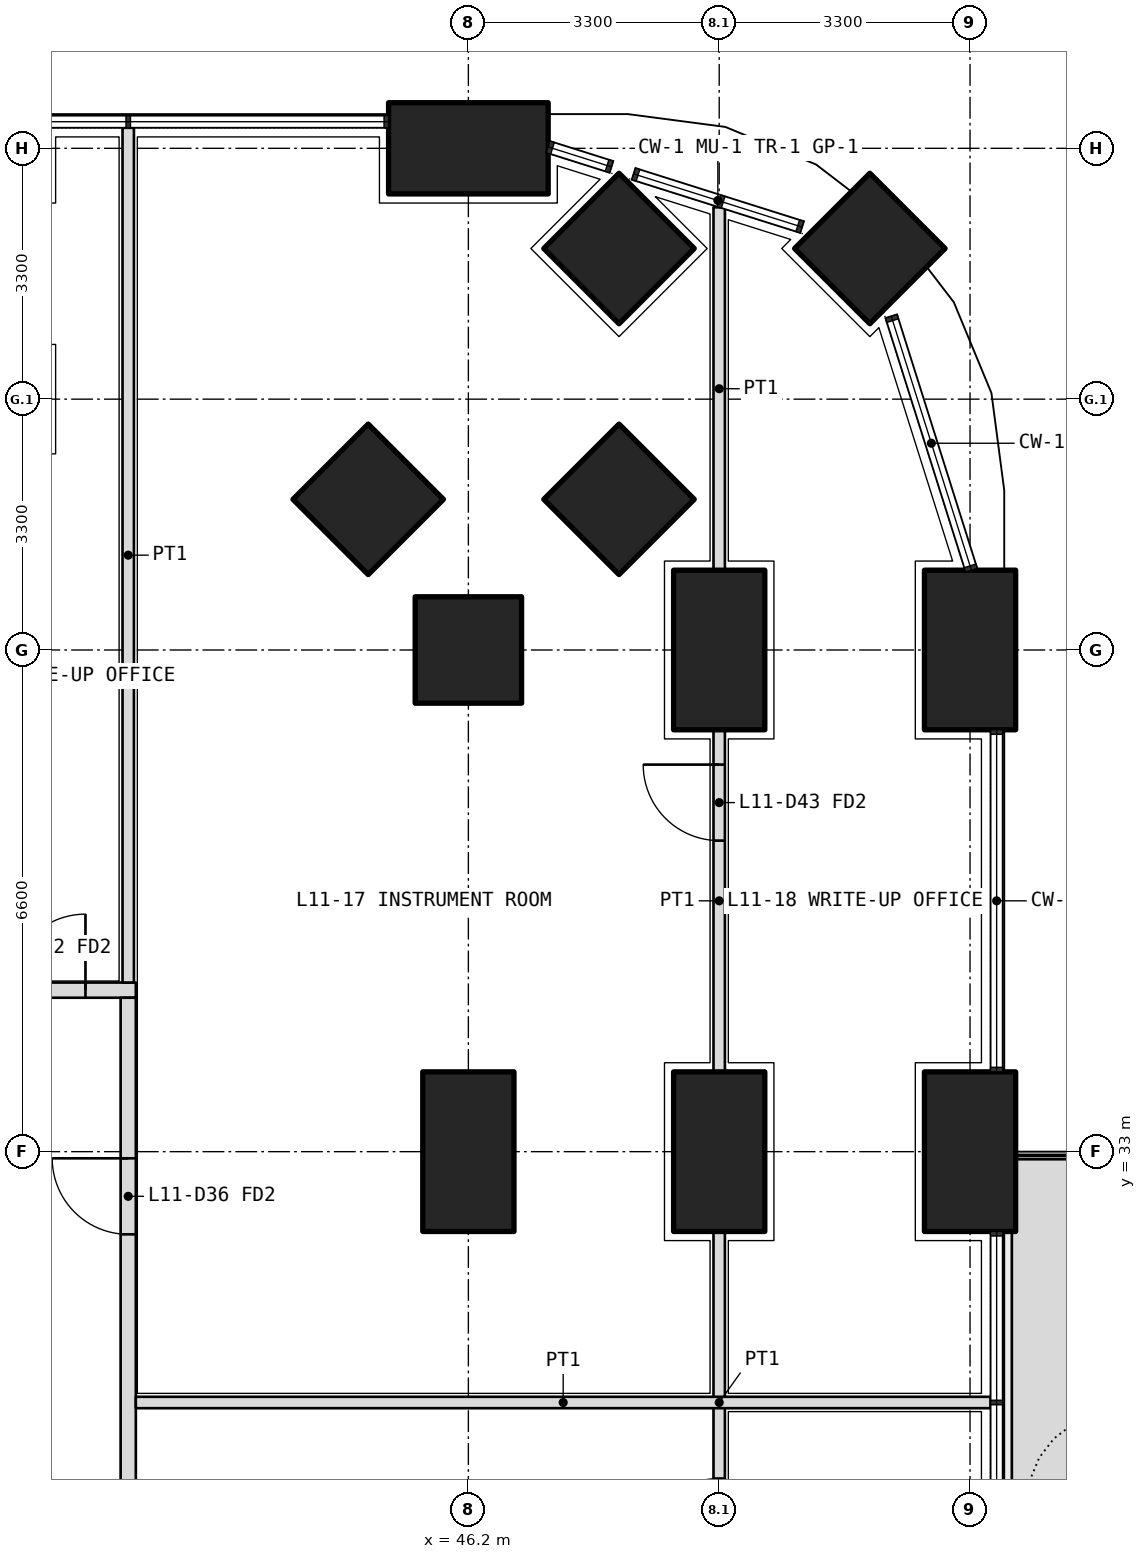
"""IFC4 building model, lengths in metres.
Left out: names, types, materials, properties, quantities, classifications, styles, units other than length and angle.
Written with IfcOpenShell. Run it as: python <this file> out.ifc"""

import sys

from ifc_helpers import new_model, si_unit, direction, frame, frame_2d, origin, origin_2d, place, context, subcontext, project, spatial, polyline, rectangle, outline, extrude, element, fill, save


model = new_model("IFC4")
c1 = context("Model", 3, precision=1e-05, world=origin(), true_north=direction((0.0, 1.0)))
c2 = subcontext(c1, "Body", "Model", "MODEL_VIEW")
j1 = project(units=[si_unit("LENGTHUNIT", "METRE"), si_unit("PLANEANGLEUNIT", "RADIAN")], contexts=[c1])
p1 = place(None, origin())
s1 = spatial("IfcSite", under=j1, at=p1, CompositionType="ELEMENT")
p2 = place(p1, origin())
s2 = spatial("IfcBuilding", under=s1, at=p2, CompositionType="ELEMENT")
p3 = place(p2, frame((0.0, 0.0, 50.7)))
s3 = spatial("IfcBuildingStorey", under=s2, at=p3, CompositionType="ELEMENT", Elevation=50.7)
p4 = place(p3, frame((51.482, 44.882, 0.0), z_axis=(0.0, 0.0, 1.0), x_axis=(0.707106781187, 0.707106781187, 0.0)))
e1 = element("IfcColumn", 1, at=p4, inside=s3, PredefinedType="COLUMN", context=c2, shape_type="SweptSolid", body=[
    extrude(rectangle(XDim=1.4, YDim=1.4, at=origin_2d()), origin(), (0.0, 0.0, 1.0), 4.2),
])
for number, where, z_axis, x_axis in (
    (2, (52.8, 33.0, 0.0), (0.0, 0.0, 1.0), (0.0, 1.0, 0.0)),
    (3, (52.8, 39.6, 0.0), (0.0, 0.0, 1.0), (0.0, 1.0, 0.0)),
    (4, (46.2, 46.2, 0.0), (0.0, 0.0, 1.0), (1.0, 0.0, 0.0)),
):
    element("IfcColumn", number, at=place(p3, frame(where, z_axis=z_axis, x_axis=x_axis)), inside=s3, PredefinedType="COLUMN", context=c2, shape_type="SweptSolid", body=[
        extrude(rectangle(XDim=2.1, YDim=1.2, at=origin_2d()), origin(), (0.0, 0.0, 1.0), 4.2),
    ])
for number, where, z_axis, x_axis in (
    (5, (46.2, 39.6, 0.0), (0.0, 0.0, 1.0), (1.0, 0.0, 0.0)),
    (6, (48.182, 44.882, 0.0), (0.0, 0.0, 1.0), (0.707, 0.707, 0.0)),
):
    element("IfcColumn", number, at=place(p3, frame(where, z_axis=z_axis, x_axis=x_axis)), inside=s3, PredefinedType="COLUMN", context=c2, shape_type="SweptSolid", body=[
        extrude(rectangle(XDim=1.4, YDim=1.4, at=origin_2d()), origin(), (0.0, 0.0, 1.0), 4.2),
    ])
for number, where, z_axis, x_axis in (
    (7, (49.5, 33.0, 0.0), (0.0, 0.0, 1.0), (0.0, 1.0, 0.0)),
    (8, (49.5, 39.6, 0.0), (0.0, 0.0, 1.0), (0.0, 1.0, 0.0)),
):
    element("IfcColumn", number, at=place(p3, frame(where, z_axis=z_axis, x_axis=x_axis)), inside=s3, PredefinedType="COLUMN", context=c2, shape_type="SweptSolid", body=[
        extrude(rectangle(XDim=2.1, YDim=1.2, at=origin_2d()), origin(), (0.0, 0.0, 1.0), 4.2),
    ])
for number, where, z_axis, x_axis in (
    (9, (48.182, 41.582, 0.0), (0.0, 0.0, 1.0), (0.707, 0.707, 0.0)),
    (10, (44.882, 41.582, 0.0), (0.0, 0.0, 1.0), (0.707, 0.707, 0.0)),
):
    element("IfcColumn", number, at=place(p3, frame(where, z_axis=z_axis, x_axis=x_axis)), inside=s3, PredefinedType="COLUMN", context=c2, shape_type="SweptSolid", body=[
        extrude(rectangle(XDim=1.4, YDim=1.4, at=origin_2d()), origin(), (0.0, 0.0, 1.0), 4.2),
    ])
p5 = place(p3, frame((46.2, 33.0, 0.0), z_axis=(0.0, 0.0, 1.0), x_axis=(0.0, 1.0, 0.0)))
e11 = element("IfcColumn", 11, at=p5, inside=s3, PredefinedType="COLUMN", context=c2, shape_type="SweptSolid", body=[
    extrude(rectangle(XDim=2.1, YDim=1.2, at=origin_2d()), origin(), (0.0, 0.0, 1.0), 4.2),
])
p6 = place(p3, origin())
e12 = element("IfcWall", 12, at=p6, inside=s3, PredefinedType="USERDEFINED", context=c2, shape_type="SweptSolid", body=[
    extrude(outline(polyline([(53.35, 23.85), (54.35, 23.85), (54.35, 32.9), (53.35, 32.9), (53.35, 23.85)]), holes=[polyline([(53.5, 24.0), (54.2, 24.0), (54.2, 32.75), (53.5, 32.75), (53.5, 24.0)])]), origin(), (0.0, 0.0, 1.0), 1.05),
])
p7 = place(p3, frame((10.975, 35.125, 0.0), z_axis=(0.0, 0.0, 1.0), x_axis=(1.0, 0.0, 0.0)))
e13 = element("IfcWall", 13, at=p7, inside=s3, PredefinedType="PARTITIONING", context=c2, shape_type="SweptSolid", body=[
    extrude(rectangle(XDim=30.85, YDim=0.2, at=frame_2d((15.425, 0.0))), origin(), (0.0, 0.0, 1.0), 2.85),
])
p8 = place(p7, frame((2.312, 0.0, 0.0)))
e14 = element("IfcOpeningElement", 14, at=p8, cuts=e13, PredefinedType="OPENING", context=c2, shape_type="SweptSolid", body=[
    extrude(rectangle(XDim=1.0, YDim=2.1, at=frame_2d((0.5, 1.05))), frame((0.0, 0.11, 0.0), z_axis=(0.0, -1.0, 0.0), x_axis=(1.0, 0.0, 0.0)), (0.0, 0.0, 1.0), 0.22),
])
p9 = place(p7, frame((11.625, 0.0, 0.0)))
e15 = element("IfcOpeningElement", 15, at=p9, cuts=e13, PredefinedType="OPENING", context=c2, shape_type="SweptSolid", body=[
    extrude(rectangle(XDim=1.0, YDim=2.1, at=frame_2d((0.5, 1.05))), frame((0.0, 0.11, 0.0), z_axis=(0.0, -1.0, 0.0), x_axis=(1.0, 0.0, 0.0)), (0.0, 0.0, 1.0), 0.22),
])
p10 = place(p7, frame((21.525, 0.0, 0.0)))
e16 = element("IfcOpeningElement", 16, at=p10, cuts=e13, PredefinedType="OPENING", context=c2, shape_type="SweptSolid", body=[
    extrude(rectangle(XDim=1.0, YDim=2.1, at=frame_2d((0.5, 1.05))), frame((0.0, 0.11, 0.0), z_axis=(0.0, -1.0, 0.0), x_axis=(1.0, 0.0, 0.0)), (0.0, 0.0, 1.0), 0.22),
])
p11 = place(p7, frame((26.475, 0.0, 0.0)))
e17 = element("IfcOpeningElement", 17, at=p11, cuts=e13, PredefinedType="OPENING", context=c2, shape_type="SweptSolid", body=[
    extrude(rectangle(XDim=1.0, YDim=2.1, at=frame_2d((0.5, 1.05))), frame((0.0, 0.11, 0.0), z_axis=(0.0, -1.0, 0.0), x_axis=(1.0, 0.0, 0.0)), (0.0, 0.0, 1.0), 0.22),
])
p12 = place(p7, frame((29.188, 0.0, 0.0)))
e18 = element("IfcOpeningElement", 18, at=p12, cuts=e13, PredefinedType="OPENING", context=c2, shape_type="SweptSolid", body=[
    extrude(rectangle(XDim=1.0, YDim=2.1, at=frame_2d((0.5, 1.05))), frame((0.0, 0.11, 0.0), z_axis=(0.0, -1.0, 0.0), x_axis=(1.0, 0.0, 0.0)), (0.0, 0.0, 1.0), 0.22),
])
p13 = place(p3, frame((41.725, 11.175, 0.0), z_axis=(0.0, 0.0, 1.0), x_axis=(0.0, 1.0, 0.0)))
e19 = element("IfcWall", 19, at=p13, inside=s3, PredefinedType="PARTITIONING", context=c2, shape_type="SweptSolid", body=[
    extrude(rectangle(XDim=23.85, YDim=0.2, at=frame_2d((11.925, 0.0))), origin(), (0.0, 0.0, 1.0), 2.85),
])
p14 = place(p13, frame((2.012, 0.0, 0.0)))
e20 = element("IfcOpeningElement", 20, at=p14, cuts=e19, PredefinedType="OPENING", context=c2, shape_type="SweptSolid", body=[
    extrude(rectangle(XDim=1.2, YDim=2.1, at=frame_2d((0.6, 1.05))), frame((0.0, 0.11, 0.0), z_axis=(0.0, -1.0, 0.0), x_axis=(1.0, 0.0, 0.0)), (0.0, 0.0, 1.0), 0.22),
])
p15 = place(p13, frame((6.475, 0.0, 0.0)))
e21 = element("IfcOpeningElement", 21, at=p15, cuts=e19, PredefinedType="OPENING", context=c2, shape_type="SweptSolid", body=[
    extrude(rectangle(XDim=1.0, YDim=2.1, at=frame_2d((0.5, 1.05))), frame((0.0, 0.11, 0.0), z_axis=(0.0, -1.0, 0.0), x_axis=(1.0, 0.0, 0.0)), (0.0, 0.0, 1.0), 0.22),
])
p16 = place(p13, frame((9.725, 0.0, 0.0)))
e22 = element("IfcOpeningElement", 22, at=p16, cuts=e19, PredefinedType="OPENING", context=c2, shape_type="SweptSolid", body=[
    extrude(rectangle(XDim=1.0, YDim=2.1, at=frame_2d((0.5, 1.05))), frame((0.0, 0.11, 0.0), z_axis=(0.0, -1.0, 0.0), x_axis=(1.0, 0.0, 0.0)), (0.0, 0.0, 1.0), 0.22),
])
p17 = place(p13, frame((13.075, 0.0, 0.0)))
e23 = element("IfcOpeningElement", 23, at=p17, cuts=e19, PredefinedType="OPENING", context=c2, shape_type="SweptSolid", body=[
    extrude(rectangle(XDim=0.9, YDim=2.1, at=frame_2d((0.45, 1.05))), frame((0.0, 0.11, 0.0), z_axis=(0.0, -1.0, 0.0), x_axis=(1.0, 0.0, 0.0)), (0.0, 0.0, 1.0), 0.22),
])
p18 = place(p13, frame((16.375, 0.0, 0.0)))
e24 = element("IfcOpeningElement", 24, at=p18, cuts=e19, PredefinedType="OPENING", context=c2, shape_type="SweptSolid", body=[
    extrude(rectangle(XDim=1.0, YDim=2.1, at=frame_2d((0.5, 1.05))), frame((0.0, 0.11, 0.0), z_axis=(0.0, -1.0, 0.0), x_axis=(1.0, 0.0, 0.0)), (0.0, 0.0, 1.0), 0.22),
])
p19 = place(p13, frame((20.738, 0.0, 0.0)))
e25 = element("IfcOpeningElement", 25, at=p19, cuts=e19, PredefinedType="OPENING", context=c2, shape_type="SweptSolid", body=[
    extrude(rectangle(XDim=1.0, YDim=2.1, at=frame_2d((0.5, 1.05))), frame((0.0, 0.11, 0.0), z_axis=(0.0, -1.0, 0.0), x_axis=(1.0, 0.0, 0.0)), (0.0, 0.0, 1.0), 0.22),
])
p20 = place(p3, frame((41.725, 46.47, 0.0), z_axis=(0.0, 0.0, 1.0), x_axis=(0.0, -1.0, 0.0)))
e26 = element("IfcWall", 26, at=p20, inside=s3, PredefinedType="PARTITIONING", context=c2, shape_type="SweptSolid", body=[
    extrude(rectangle(XDim=11.245, YDim=0.15, at=frame_2d((5.623, 0.0))), origin(), (0.0, 0.0, 1.0), 2.7),
])
p21 = place(p3, frame((49.5, 27.45, 0.0), z_axis=(0.0, 0.0, 1.0), x_axis=(0.0, 1.0, 0.0)))
e27 = element("IfcWall", 27, at=p21, inside=s3, PredefinedType="PARTITIONING", context=c2, shape_type="SweptSolid", body=[
    extrude(rectangle(XDim=4.5, YDim=0.15, at=frame_2d((2.25, 0.0))), origin(), (0.0, 0.0, 1.0), 3.9),
])
p22 = place(p21, frame((0.25, 0.0, 0.0)))
e28 = element("IfcOpeningElement", 28, at=p22, cuts=e27, PredefinedType="OPENING", context=c2, shape_type="SweptSolid", body=[
    extrude(rectangle(XDim=1.0, YDim=2.1, at=frame_2d((0.5, 1.05))), frame((0.0, 0.085, 0.0), z_axis=(0.0, -1.0, 0.0), x_axis=(1.0, 0.0, 0.0)), (0.0, 0.0, 1.0), 0.17),
])
p23 = place(p3, frame((49.5, 34.05, 0.0), z_axis=(0.0, 0.0, 1.0), x_axis=(0.0, 1.0, 0.0)))
e29 = element("IfcWall", 29, at=p23, inside=s3, PredefinedType="PARTITIONING", context=c2, shape_type="SweptSolid", body=[
    extrude(rectangle(XDim=4.5, YDim=0.15, at=frame_2d((2.25, 0.0))), origin(), (0.0, 0.0, 1.0), 3.9),
])
p24 = place(p23, frame((3.042, 0.0, 0.0)))
e30 = element("IfcOpeningElement", 30, at=p24, cuts=e29, PredefinedType="OPENING", context=c2, shape_type="SweptSolid", body=[
    extrude(rectangle(XDim=1.0, YDim=2.1, at=frame_2d((0.5, 1.05))), frame((0.0, 0.085, 0.0), z_axis=(0.0, -1.0, 0.0), x_axis=(1.0, 0.0, 0.0)), (0.0, 0.0, 1.0), 0.17),
])
p25 = place(p3, frame((49.5, 40.65, 0.0), z_axis=(0.0, 0.0, 1.0), x_axis=(0.0, 1.0, 0.0)))
e31 = element("IfcWall", 31, at=p25, inside=s3, PredefinedType="PARTITIONING", context=c2, shape_type="SweptSolid", body=[
    extrude(rectangle(XDim=4.774, YDim=0.15, at=frame_2d((2.387, 0.0))), origin(), (0.0, 0.0, 1.0), 2.7),
])
p26 = place(p3, frame((53.07, 29.7, 0.0), z_axis=(0.0, 0.0, 1.0), x_axis=(-1.0, 0.0, 0.0)))
e32 = element("IfcWall", 32, at=p26, inside=s3, PredefinedType="PARTITIONING", context=c2, shape_type="SweptSolid", body=[
    extrude(rectangle(XDim=11.245, YDim=0.15, at=frame_2d((5.623, 0.0))), origin(), (0.0, 0.0, 1.0), 2.7),
])
p27 = place(p19, origin())
e33 = element("IfcDoor", 33, at=p27, inside=s3, OperationType="SINGLE_SWING_RIGHT", PredefinedType="DOOR", context=c2, shape_type="SweptSolid", body=[
    extrude(rectangle(XDim=1.0, YDim=2.1, at=frame_2d((0.5, 1.05))), frame((0.0, 0.025, 0.0), z_axis=(0.0, -1.0, 0.0), x_axis=(1.0, 0.0, 0.0)), (0.0, 0.0, 1.0), 0.05),
])
fill(e25, e33)
p28 = place(p24, origin())
e34 = element("IfcDoor", 34, at=p28, inside=s3, OperationType="SINGLE_SWING_RIGHT", PredefinedType="DOOR", context=c2, shape_type="SweptSolid", body=[
    extrude(rectangle(XDim=1.0, YDim=2.1, at=frame_2d((0.5, 1.05))), frame((0.0, 0.025, 0.0), z_axis=(0.0, -1.0, 0.0), x_axis=(1.0, 0.0, 0.0)), (0.0, 0.0, 1.0), 0.05),
])
fill(e30, e34)
p29 = place(p12, origin())
e35 = element("IfcDoor", 35, at=p29, inside=s3, OperationType="SINGLE_SWING_RIGHT", PredefinedType="DOOR", context=c2, shape_type="SweptSolid", body=[
    extrude(rectangle(XDim=1.0, YDim=2.1, at=frame_2d((0.5, 1.05))), frame((0.0, 0.025, 0.0), z_axis=(0.0, -1.0, 0.0), x_axis=(1.0, 0.0, 0.0)), (0.0, 0.0, 1.0), 0.05),
])
fill(e18, e35)
save(model, sys.argv[1])
